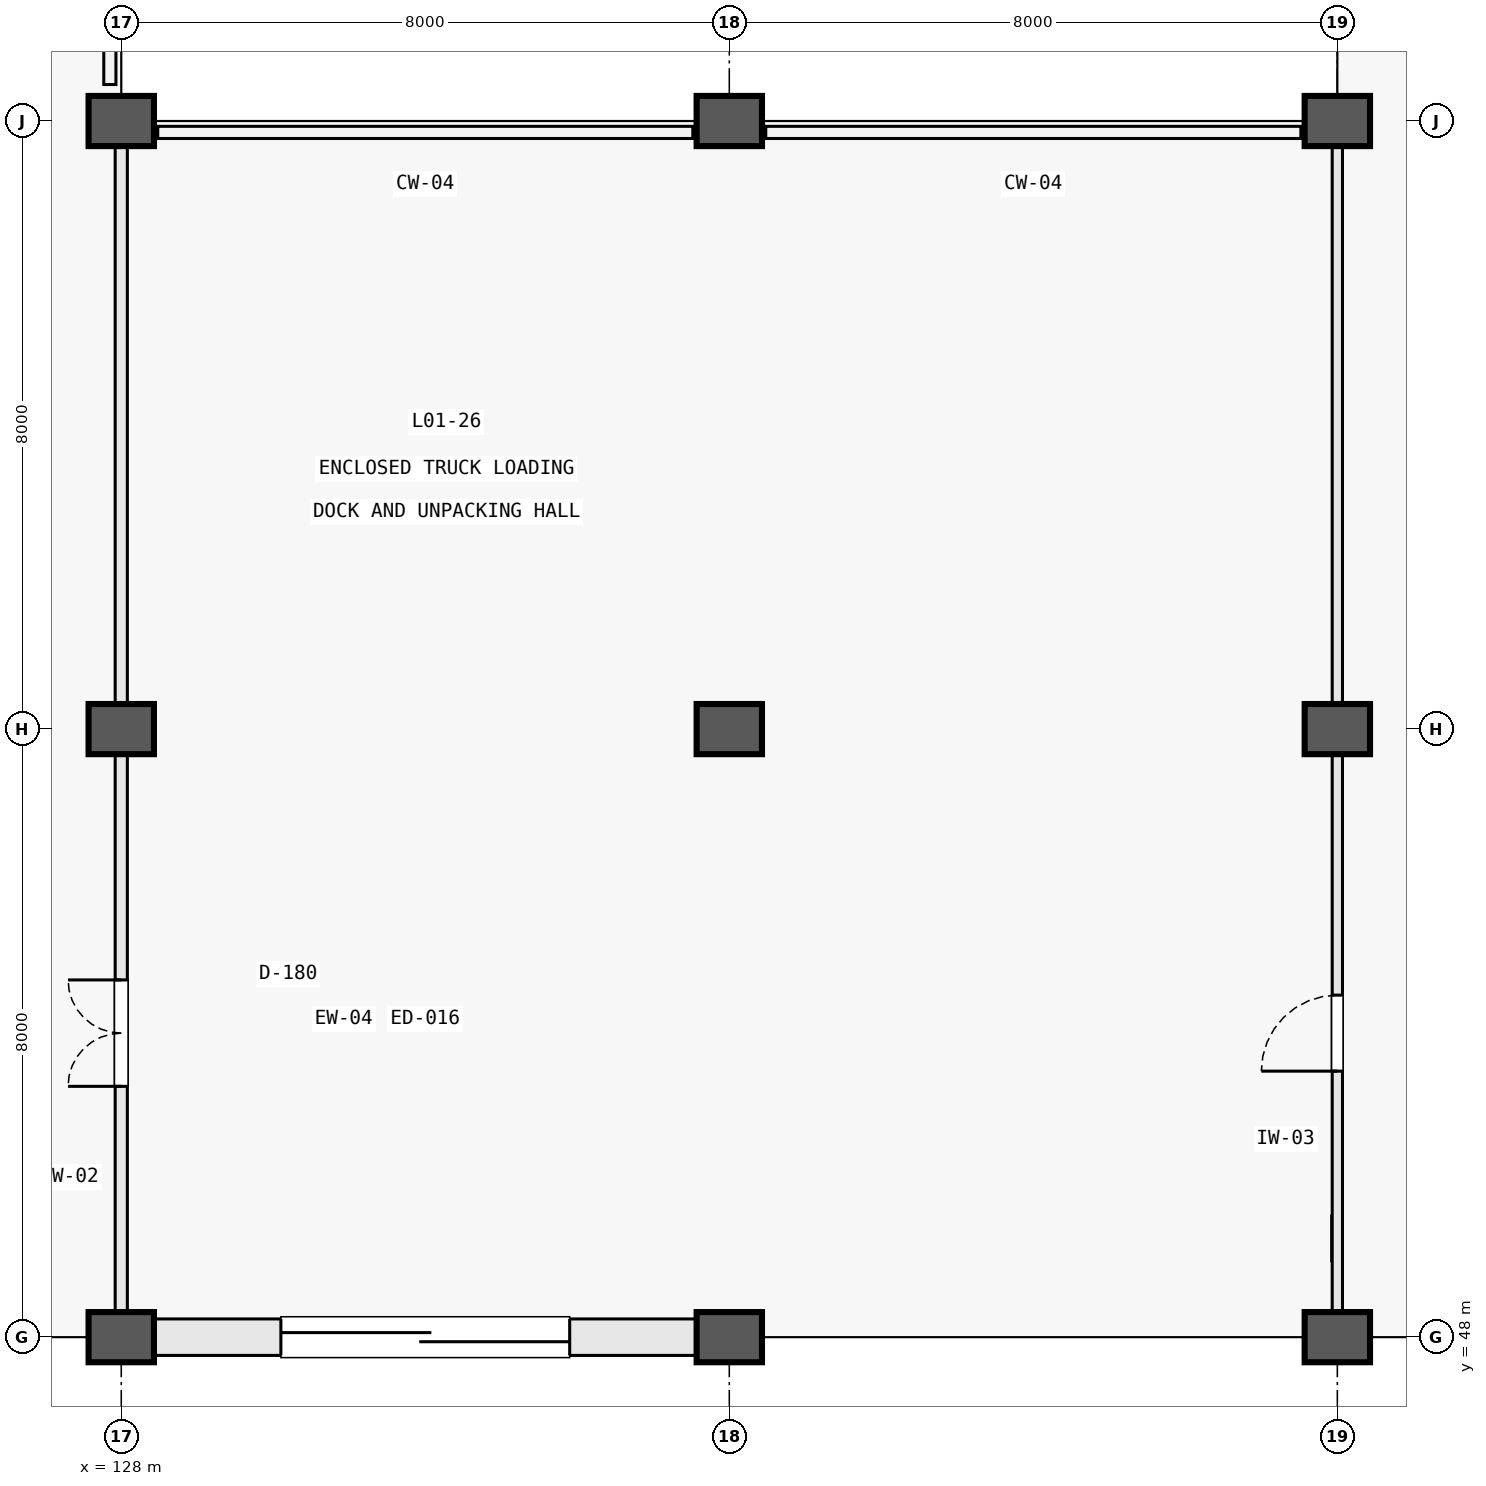
"""IFC4 building model, lengths in metres.
Left out: names, types, materials, properties, quantities, classifications, styles, units other than length and angle.
Written with IfcOpenShell. Run it as: python <this file> out.ifc"""

import sys

from ifc_helpers import new_model, si_unit, direction, frame, frame_2d, origin, origin_2d, place, context, subcontext, project, spatial, rectangle, extrude, element, fill, save


model = new_model("IFC4")
c1 = context("Model", 3, precision=1e-05, world=origin(), true_north=direction((0.0, 1.0)))
c2 = subcontext(c1, "Body", "Model", "MODEL_VIEW")
j1 = project(units=[si_unit("LENGTHUNIT", "METRE"), si_unit("PLANEANGLEUNIT", "RADIAN")], contexts=[c1])
p1 = place(None, origin())
s1 = spatial("IfcSite", under=j1, at=p1, CompositionType="ELEMENT")
p2 = place(p1, origin())
s2 = spatial("IfcBuilding", under=s1, at=p2, CompositionType="ELEMENT")
p3 = place(p2, origin())
s3 = spatial("IfcBuildingStorey", under=s2, at=p3, CompositionType="ELEMENT", Elevation=0.0)
for number, where, z_axis, x_axis in (
    (1, (128.0, 48.0, 0.0), (0.0, 0.0, 1.0), (1.0, 0.0, 0.0)),
    (2, (128.0, 56.0, 0.0), (0.0, 0.0, 1.0), (1.0, 0.0, 0.0)),
    (3, (128.0, 64.0, 0.0), (0.0, 0.0, 1.0), (1.0, 0.0, 0.0)),
    (4, (136.0, 48.0, 0.0), (0.0, 0.0, 1.0), (1.0, 0.0, 0.0)),
    (5, (136.0, 56.0, 0.0), (0.0, 0.0, 1.0), (1.0, 0.0, 0.0)),
    (6, (136.0, 64.0, 0.0), (0.0, 0.0, 1.0), (1.0, 0.0, 0.0)),
    (7, (144.0, 48.0, 0.0), (0.0, 0.0, 1.0), (1.0, 0.0, 0.0)),
    (8, (144.0, 56.0, 0.0), (0.0, 0.0, 1.0), (1.0, 0.0, 0.0)),
    (9, (144.0, 64.0, 0.0), (0.0, 0.0, 1.0), (1.0, 0.0, 0.0)),
):
    element("IfcColumn", number, at=place(p3, frame(where, z_axis=z_axis, x_axis=x_axis)), inside=s3, PredefinedType="COLUMN", context=c2, shape_type="SweptSolid", body=[
        extrude(rectangle(XDim=0.86, YDim=0.66, at=origin_2d()), origin(), (0.0, 0.0, 1.0), 5.4),
    ])
p4 = place(p3, frame((128.425, 48.0, 0.0), z_axis=(0.0, 0.0, 1.0), x_axis=(1.0, 0.0, 0.0)))
e10 = element("IfcWall", 10, at=p4, inside=s3, PredefinedType="STANDARD", context=c2, shape_type="SweptSolid", body=[
    extrude(rectangle(XDim=7.15, YDim=0.48, at=frame_2d((3.575, 0.0))), origin(), (0.0, 0.0, 1.0), 3.91),
])
p5 = place(p4, frame((1.675, 0.0, 0.0)))
e11 = element("IfcOpeningElement", 11, at=p5, cuts=e10, PredefinedType="OPENING", context=c2, shape_type="SweptSolid", body=[
    extrude(rectangle(XDim=3.8, YDim=3.6, at=frame_2d((1.9, 1.8))), frame((0.0, 0.252, 0.0), z_axis=(0.0, -1.0, 0.0), x_axis=(1.0, 0.0, 0.0)), (0.0, 0.0, 1.0), 0.504),
])
p6 = place(p3, frame((144.0, 48.34, 0.0), z_axis=(0.0, 0.0, 1.0), x_axis=(0.0, 1.0, 0.0)))
e12 = element("IfcWall", 12, at=p6, inside=s3, PredefinedType="PARTITIONING", context=c2, shape_type="SweptSolid", body=[
    extrude(rectangle(XDim=7.32, YDim=0.135, at=frame_2d((3.66, 0.0))), origin(), (0.0, 0.0, 1.0), 3.88),
])
p7 = place(p6, frame((3.16, 0.0, 0.0)))
e13 = element("IfcOpeningElement", 13, at=p7, cuts=e12, PredefinedType="OPENING", context=c2, shape_type="SweptSolid", body=[
    extrude(rectangle(XDim=1.0, YDim=2.15, at=frame_2d((0.5, 1.075))), frame((0.0, 0.08, 0.0), z_axis=(0.0, -1.0, 0.0), x_axis=(1.0, 0.0, 0.0)), (0.0, 0.0, 1.0), 0.159),
])
p8 = place(p3, frame((144.0, 56.34, 0.0), z_axis=(0.0, 0.0, 1.0), x_axis=(0.0, 1.0, 0.0)))
e14 = element("IfcWall", 14, at=p8, inside=s3, PredefinedType="PARTITIONING", context=c2, shape_type="SweptSolid", body=[
    extrude(rectangle(XDim=7.32, YDim=0.135, at=frame_2d((3.66, 0.0))), origin(), (0.0, 0.0, 1.0), 3.88),
])
p9 = place(p3, frame((128.0, 48.34, 0.0), z_axis=(0.0, 0.0, 1.0), x_axis=(0.0, 1.0, 0.0)))
e15 = element("IfcWall", 15, at=p9, inside=s3, PredefinedType="PARTITIONING", context=c2, shape_type="SweptSolid", body=[
    extrude(rectangle(XDim=7.32, YDim=0.16, at=frame_2d((3.66, 0.0))), origin(), (0.0, 0.0, 1.0), 3.88),
])
p10 = place(p9, frame((2.96, 0.0, 0.0)))
e16 = element("IfcOpeningElement", 16, at=p10, cuts=e15, PredefinedType="OPENING", context=c2, shape_type="SweptSolid", body=[
    extrude(rectangle(XDim=1.4, YDim=2.2, at=frame_2d((0.7, 1.1))), frame((0.0, 0.092, 0.0), z_axis=(0.0, -1.0, 0.0), x_axis=(1.0, 0.0, 0.0)), (0.0, 0.0, 1.0), 0.184),
])
p11 = place(p3, frame((128.0, 56.34, 0.0), z_axis=(0.0, 0.0, 1.0), x_axis=(0.0, 1.0, 0.0)))
e17 = element("IfcWall", 17, at=p11, inside=s3, PredefinedType="PARTITIONING", context=c2, shape_type="SweptSolid", body=[
    extrude(rectangle(XDim=7.32, YDim=0.16, at=frame_2d((3.66, 0.0))), origin(), (0.0, 0.0, 1.0), 3.88),
])
p12 = place(p5, frame((3.8, 0.0, 0.0), z_axis=(0.0, 0.0, 1.0), x_axis=(-1.0, 0.0, 0.0)))
e18 = element("IfcDoor", 18, at=p12, inside=s3, OperationType="ROLLINGUP", PredefinedType="DOOR", context=c2, shape_type="SweptSolid", body=[
    extrude(rectangle(XDim=3.8, YDim=3.6, at=frame_2d((1.9, 1.8))), frame((0.0, 0.025, 0.0), z_axis=(0.0, -1.0, 0.0), x_axis=(1.0, 0.0, 0.0)), (0.0, 0.0, 1.0), 0.05),
])
fill(e11, e18)
p13 = place(p7, origin())
e19 = element("IfcDoor", 19, at=p13, inside=s3, OperationType="SINGLE_SWING_LEFT", PredefinedType="DOOR", context=c2, shape_type="SweptSolid", body=[
    extrude(rectangle(XDim=1.0, YDim=2.15, at=frame_2d((0.5, 1.075))), frame((0.0, 0.025, 0.0), z_axis=(0.0, -1.0, 0.0), x_axis=(1.0, 0.0, 0.0)), (0.0, 0.0, 1.0), 0.05),
])
fill(e13, e19)
p14 = place(p10, origin())
e20 = element("IfcDoor", 20, at=p14, inside=s3, OperationType="DOUBLE_DOOR_SINGLE_SWING", PredefinedType="DOOR", context=c2, shape_type="SweptSolid", body=[
    extrude(rectangle(XDim=1.4, YDim=2.2, at=frame_2d((0.7, 1.1))), frame((0.0, 0.025, 0.0), z_axis=(0.0, -1.0, 0.0), x_axis=(1.0, 0.0, 0.0)), (0.0, 0.0, 1.0), 0.05),
])
fill(e16, e20)
save(model, sys.argv[1])
